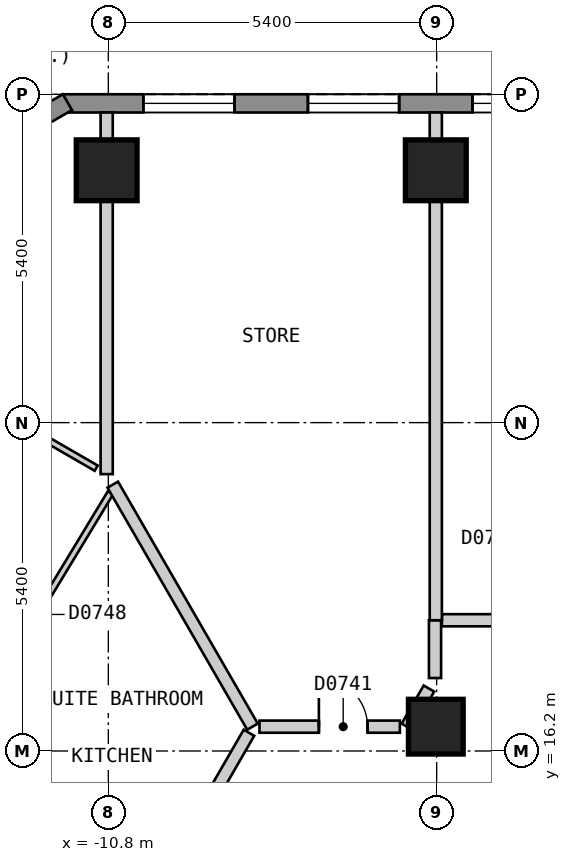
"""IFC4 building model, lengths in metres.
Left out: names, types, materials, properties, quantities, classifications, styles, units other than length and angle.
Written with IfcOpenShell. Run it as: python <this file> out.ifc"""

import sys

from ifc_helpers import new_model, si_unit, direction, frame, frame_2d, origin, origin_2d, place, context, subcontext, project, spatial, polyline, rectangle, outline, extrude, element, fill, save


model = new_model("IFC4")
c1 = context("Model", 3, precision=1e-05, world=origin(), true_north=direction((0.0, 1.0)))
c2 = subcontext(c1, "Body", "Model", "MODEL_VIEW")
j1 = project(units=[si_unit("LENGTHUNIT", "METRE"), si_unit("PLANEANGLEUNIT", "RADIAN")], contexts=[c1])
p1 = place(None, origin())
s1 = spatial("IfcSite", under=j1, at=p1, CompositionType="ELEMENT")
p2 = place(p1, origin())
s2 = spatial("IfcBuilding", under=s1, at=p2, CompositionType="ELEMENT")
p3 = place(p2, frame((0.0, 0.0, 105.0)))
s3 = spatial("IfcBuildingStorey", under=s2, at=p3, CompositionType="ELEMENT", Elevation=105.0)
for number, where, z_axis, x_axis in (
    (1, (-5.414, 25.75, 0.0), (0.0, 0.0, 1.0), (-1.0, 0.0, 0.0)),
    (2, (-10.827, 25.75, 0.0), (0.0, 0.0, 1.0), (-1.0, 0.0, 0.0)),
):
    element("IfcColumn", number, at=place(p3, frame(where, z_axis=z_axis, x_axis=x_axis)), inside=s3, PredefinedType="COLUMN", context=c2, shape_type="SweptSolid", body=[
        extrude(rectangle(XDim=1.0, YDim=1.0, at=origin_2d()), origin(), (0.0, 0.0, 1.0), 3.0),
    ])
p4 = place(p3, frame((-5.414, 16.6, 0.0), z_axis=(0.0, 0.0, 1.0), x_axis=(-1.0, 0.0, 0.0)))
e3 = element("IfcColumn", 3, at=p4, inside=s3, PredefinedType="COLUMN", context=c2, shape_type="SweptSolid", body=[
    extrude(rectangle(XDim=0.9, YDim=0.9, at=origin_2d()), origin(), (0.0, 0.0, 1.0), 3.0),
])
p5 = place(p3, frame((11.547, 26.85, 0.0), z_axis=(0.0, 0.0, 1.0), x_axis=(-1.0, 0.0, 0.0)))
e4 = element("IfcWall", 4, at=p5, inside=s3, PredefinedType="SOLIDWALL", context=c2, shape_type="SweptSolid", body=[
    extrude(outline(polyline([(0.0, -0.15), (23.094, -0.15), (23.014, 0.15), (0.08, 0.15), (0.0, -0.15)])), origin(), (0.0, 0.0, 1.0), 2.6),
])
p6 = place(p5, frame((1.325, 0.0, 0.15)))
e5 = element("IfcOpeningElement", 5, at=p6, cuts=e4, PredefinedType="OPENING", context=c2, shape_type="SweptSolid", body=[
    extrude(rectangle(XDim=1.5, YDim=2.1, at=frame_2d((0.75, 1.05))), frame((0.0, 0.16, 0.0), z_axis=(0.0, -1.0, 0.0), x_axis=(1.0, 0.0, 0.0)), (0.0, 0.0, 1.0), 0.32),
])
p7 = place(p5, frame((4.032, 0.0, 0.15)))
e6 = element("IfcOpeningElement", 6, at=p7, cuts=e4, PredefinedType="OPENING", context=c2, shape_type="SweptSolid", body=[
    extrude(rectangle(XDim=1.5, YDim=2.1, at=frame_2d((0.75, 1.05))), frame((0.0, 0.16, 0.0), z_axis=(0.0, -1.0, 0.0), x_axis=(1.0, 0.0, 0.0)), (0.0, 0.0, 1.0), 0.32),
])
p8 = place(p5, frame((6.738, 0.0, 0.15)))
e7 = element("IfcOpeningElement", 7, at=p8, cuts=e4, PredefinedType="OPENING", context=c2, shape_type="SweptSolid", body=[
    extrude(rectangle(XDim=1.5, YDim=2.1, at=frame_2d((0.75, 1.05))), frame((0.0, 0.16, 0.0), z_axis=(0.0, -1.0, 0.0), x_axis=(1.0, 0.0, 0.0)), (0.0, 0.0, 1.0), 0.32),
])
p9 = place(p5, frame((9.445, 0.0, 0.15)))
e8 = element("IfcOpeningElement", 8, at=p9, cuts=e4, PredefinedType="OPENING", context=c2, shape_type="SweptSolid", body=[
    extrude(rectangle(XDim=1.5, YDim=2.1, at=frame_2d((0.75, 1.05))), frame((0.0, 0.16, 0.0), z_axis=(0.0, -1.0, 0.0), x_axis=(1.0, 0.0, 0.0)), (0.0, 0.0, 1.0), 0.32),
])
p10 = place(p5, frame((12.151, 0.0, 0.15)))
e9 = element("IfcOpeningElement", 9, at=p10, cuts=e4, PredefinedType="OPENING", context=c2, shape_type="SweptSolid", body=[
    extrude(rectangle(XDim=1.5, YDim=2.1, at=frame_2d((0.75, 1.05))), frame((0.0, 0.16, 0.0), z_axis=(0.0, -1.0, 0.0), x_axis=(1.0, 0.0, 0.0)), (0.0, 0.0, 1.0), 0.32),
])
p11 = place(p5, frame((14.858, 0.0, 0.15)))
e10 = element("IfcOpeningElement", 10, at=p11, cuts=e4, PredefinedType="OPENING", context=c2, shape_type="SweptSolid", body=[
    extrude(rectangle(XDim=1.5, YDim=2.1, at=frame_2d((0.75, 1.05))), frame((0.0, 0.16, 0.0), z_axis=(0.0, -1.0, 0.0), x_axis=(1.0, 0.0, 0.0)), (0.0, 0.0, 1.0), 0.32),
])
p12 = place(p5, frame((17.564, 0.0, 0.15)))
e11 = element("IfcOpeningElement", 11, at=p12, cuts=e4, PredefinedType="OPENING", context=c2, shape_type="SweptSolid", body=[
    extrude(rectangle(XDim=1.5, YDim=2.1, at=frame_2d((0.75, 1.05))), frame((0.0, 0.16, 0.0), z_axis=(0.0, -1.0, 0.0), x_axis=(1.0, 0.0, 0.0)), (0.0, 0.0, 1.0), 0.32),
])
p13 = place(p5, frame((20.271, 0.0, 0.15)))
e12 = element("IfcOpeningElement", 12, at=p13, cuts=e4, PredefinedType="OPENING", context=c2, shape_type="SweptSolid", body=[
    extrude(rectangle(XDim=1.5, YDim=2.1, at=frame_2d((0.75, 1.05))), frame((0.0, 0.16, 0.0), z_axis=(0.0, -1.0, 0.0), x_axis=(1.0, 0.0, 0.0)), (0.0, 0.0, 1.0), 0.32),
])
p14 = place(p3, frame((-11.472, 26.87, 0.0), z_axis=(0.0, 0.0, 1.0), x_axis=(-0.866022959057, -0.500004234368, 0.0)))
e13 = element("IfcWall", 13, at=p14, inside=s3, PredefinedType="SOLIDWALL", context=c2, shape_type="SweptSolid", body=[
    extrude(outline(polyline([(0.0, -0.15), (5.0, -0.15), (4.92, 0.15), (0.08, 0.15), (0.0, -0.15)])), origin(), (0.0, 0.0, 1.0), 2.6),
])
p15 = place(p14, frame((0.65, 0.0, 0.15)))
e14 = element("IfcOpeningElement", 14, at=p15, cuts=e13, PredefinedType="OPENING", context=c2, shape_type="SweptSolid", body=[
    extrude(rectangle(XDim=1.2, YDim=2.1, at=frame_2d((0.6, 1.05))), frame((0.0, 0.16, 0.0), z_axis=(0.0, -1.0, 0.0), x_axis=(1.0, 0.0, 0.0)), (0.0, 0.0, 1.0), 0.32),
])
p16 = place(p14, frame((3.149, 0.0, 0.15)))
e15 = element("IfcOpeningElement", 15, at=p16, cuts=e13, PredefinedType="OPENING", context=c2, shape_type="SweptSolid", body=[
    extrude(rectangle(XDim=1.2, YDim=2.1, at=frame_2d((0.6, 1.05))), frame((0.0, 0.16, 0.0), z_axis=(0.0, -1.0, 0.0), x_axis=(1.0, 0.0, 0.0)), (0.0, 0.0, 1.0), 0.32),
])
p17 = place(p3, frame((-8.314, 16.6, 0.0), z_axis=(0.0, 0.0, 1.0), x_axis=(1.0, 0.0, 0.0)))
e16 = element("IfcWall", 16, at=p17, inside=s3, PredefinedType="PARTITIONING", context=c2, shape_type="SweptSolid", body=[
    extrude(rectangle(XDim=2.309, YDim=0.2, at=frame_2d((1.155, 0.0))), origin(), (0.0, 0.0, 1.0), 2.6),
])
p18 = place(p17, frame((0.977, 0.0, 0.0)))
e17 = element("IfcOpeningElement", 17, at=p18, cuts=e16, PredefinedType="OPENING", context=c2, shape_type="SweptSolid", body=[
    extrude(rectangle(XDim=0.8, YDim=2.1, at=frame_2d((0.4, 1.05))), frame((0.0, 0.11, 0.0), z_axis=(0.0, -1.0, 0.0), x_axis=(1.0, 0.0, 0.0)), (0.0, 0.0, 1.0), 0.22),
])
p19 = place(p3, frame((-5.314, 18.35, 0.0), z_axis=(0.0, 0.0, 1.0), x_axis=(1.0, 0.0, 0.0)))
e18 = element("IfcWall", 18, at=p19, inside=s3, PredefinedType="PARTITIONING", context=c2, shape_type="SweptSolid", body=[
    extrude(rectangle(XDim=7.062, YDim=0.2, at=frame_2d((3.531, 0.0))), origin(), (0.0, 0.0, 1.0), 2.6),
])
p20 = place(p19, frame((2.106, 0.0, 0.0)))
e19 = element("IfcOpeningElement", 19, at=p20, cuts=e18, PredefinedType="OPENING", context=c2, shape_type="SweptSolid", body=[
    extrude(rectangle(XDim=1.0, YDim=2.1, at=frame_2d((0.5, 1.05))), frame((0.0, 0.11, 0.0), z_axis=(0.0, -1.0, 0.0), x_axis=(1.0, 0.0, 0.0)), (0.0, 0.0, 1.0), 0.22),
])
p21 = place(p3, frame((-5.889, 16.6, 0.0), z_axis=(0.0, 0.0, 1.0), x_axis=(0.499839240638, 0.866118198353, 0.0)))
e20 = element("IfcWall", 20, at=p21, inside=s3, PredefinedType="PARTITIONING", context=c2, shape_type="SweptSolid", body=[
    extrude(rectangle(XDim=0.724, YDim=0.2, at=frame_2d((0.362, 0.0))), origin(), (0.0, 0.0, 1.0), 2.6),
])
p22 = place(p3, frame((-18.533, -0.901, 0.0), z_axis=(0.0, 0.0, 1.0), x_axis=(0.499981198768, 0.866036258409, 0.0)))
e21 = element("IfcWall", 21, at=p22, inside=s3, PredefinedType="PARTITIONING", context=c2, shape_type="SweptSolid", body=[
    extrude(rectangle(XDim=20.093, YDim=0.2, at=frame_2d((10.046, 0.0))), origin(), (0.0, 0.0, 1.0), 2.6),
])
p23 = place(p22, frame((14.57, 0.0, 0.0)))
e22 = element("IfcOpeningElement", 22, at=p23, cuts=e21, PredefinedType="OPENING", context=c2, shape_type="SweptSolid", body=[
    extrude(rectangle(XDim=1.0, YDim=2.1, at=frame_2d((0.5, 1.05))), frame((0.0, 0.11, 0.0), z_axis=(0.0, -1.0, 0.0), x_axis=(1.0, 0.0, 0.0)), (0.0, 0.0, 1.0), 0.22),
])
p24 = place(p22, frame((4.523, 0.0, 0.0)))
e23 = element("IfcOpeningElement", 23, at=p24, cuts=e21, PredefinedType="OPENING", context=c2, shape_type="SweptSolid", body=[
    extrude(rectangle(XDim=1.0, YDim=2.1, at=frame_2d((0.5, 1.05))), frame((0.0, 0.11, 0.0), z_axis=(0.0, -1.0, 0.0), x_axis=(1.0, 0.0, 0.0)), (0.0, 0.0, 1.0), 0.22),
])
p25 = place(p3, frame((-5.427, 17.4, 0.0), z_axis=(0.0, 0.0, 1.0), x_axis=(0.0, 1.0, 0.0)))
e24 = element("IfcWall", 24, at=p25, inside=s3, PredefinedType="PARTITIONING", context=c2, shape_type="SweptSolid", body=[
    extrude(rectangle(XDim=0.95, YDim=0.2, at=frame_2d((0.475, 0.0))), origin(), (0.0, 0.0, 1.0), 2.6),
])
p26 = place(p3, frame((-18.489, 19.375, 0.0), z_axis=(0.0, 0.0, 1.0), x_axis=(0.866016855193, -0.500014806302, 0.0)))
e25 = element("IfcWall", 25, at=p26, inside=s3, PredefinedType="PARTITIONING", context=c2, shape_type="SweptSolid", body=[
    extrude(rectangle(XDim=10.0, YDim=0.1, at=frame_2d((5.0, 0.0))), origin(), (0.0, 0.0, 1.0), 2.6),
])
p27 = place(p26, frame((2.577, 0.0, 0.0)))
e26 = element("IfcOpeningElement", 26, at=p27, cuts=e25, PredefinedType="OPENING", context=c2, shape_type="SweptSolid", body=[
    extrude(rectangle(XDim=0.9, YDim=2.1, at=frame_2d((0.45, 1.05))), frame((0.0, 0.06, 0.0), z_axis=(0.0, -1.0, 0.0), x_axis=(1.0, 0.0, 0.0)), (0.0, 0.0, 1.0), 0.12),
])
p28 = place(p3, frame((-15.977, 23.725, 0.0), z_axis=(0.0, 0.0, 1.0), x_axis=(0.866028566888, -0.499994521305, 0.0)))
e27 = element("IfcWall", 27, at=p28, inside=s3, PredefinedType="PARTITIONING", context=c2, shape_type="SweptSolid", body=[
    extrude(rectangle(XDim=5.748, YDim=0.1, at=frame_2d((2.874, 0.0))), origin(), (0.0, 0.0, 1.0), 2.6),
])
p29 = place(p28, frame((2.524, 0.0, 0.0)))
e28 = element("IfcOpeningElement", 28, at=p29, cuts=e27, PredefinedType="OPENING", context=c2, shape_type="SweptSolid", body=[
    extrude(rectangle(XDim=0.9, YDim=2.1, at=frame_2d((0.45, 1.05))), frame((0.0, 0.06, 0.0), z_axis=(0.0, -1.0, 0.0), x_axis=(1.0, 0.0, 0.0)), (0.0, 0.0, 1.0), 0.12),
])
p30 = place(p3, frame((-13.221, 16.391, 0.0), z_axis=(0.0, 0.0, 1.0), x_axis=(0.518164725284, 0.855280841286, 0.0)))
e29 = element("IfcWall", 29, at=p30, inside=s3, PredefinedType="PARTITIONING", context=c2, shape_type="SweptSolid", body=[
    extrude(rectangle(XDim=4.74, YDim=0.1, at=frame_2d((2.37, 0.0))), origin(), (0.0, 0.0, 1.0), 2.6),
])
p31 = place(p30, frame((2.002, 0.0, 0.0)))
e30 = element("IfcOpeningElement", 30, at=p31, cuts=e29, PredefinedType="OPENING", context=c2, shape_type="SweptSolid", body=[
    extrude(rectangle(XDim=0.8, YDim=2.1, at=frame_2d((0.4, 1.05))), frame((0.0, 0.06, 0.0), z_axis=(0.0, -1.0, 0.0), x_axis=(1.0, 0.0, 0.0)), (0.0, 0.0, 1.0), 0.12),
])
p32 = place(p3, frame((-10.727, 20.58, 0.0), z_axis=(0.0, 0.0, 1.0), x_axis=(0.500041272028, -0.866001574057, 0.0)))
e31 = element("IfcWall", 31, at=p32, inside=s3, PredefinedType="PARTITIONING", context=c2, shape_type="SweptSolid", body=[
    extrude(rectangle(XDim=4.596, YDim=0.2, at=frame_2d((2.298, 0.0))), origin(), (0.0, 0.0, 1.0), 2.6),
])
p33 = place(p3, frame((-5.414, 26.7, 0.0), z_axis=(0.0, 0.0, 1.0), x_axis=(0.0, -1.0, 0.0)))
e32 = element("IfcWall", 32, at=p33, inside=s3, PredefinedType="PARTITIONING", context=c2, shape_type="SweptSolid", body=[
    extrude(rectangle(XDim=8.35, YDim=0.2, at=frame_2d((4.175, 0.0))), origin(), (0.0, 0.0, 1.0), 2.6),
])
p34 = place(p3, frame((-10.827, 20.753, 0.0), z_axis=(0.0, 0.0, 1.0), x_axis=(0.0, 1.0, 0.0)))
e33 = element("IfcWall", 33, at=p34, inside=s3, PredefinedType="PARTITIONING", context=c2, shape_type="SweptSolid", body=[
    extrude(rectangle(XDim=5.947, YDim=0.2, at=frame_2d((2.974, 0.0))), origin(), (0.0, 0.0, 1.0), 2.6),
])
p35 = place(p11, origin())
e34 = element("IfcWindow", 34, at=p35, inside=s3, PartitioningType="SINGLE_PANEL", PredefinedType="WINDOW", context=c2, shape_type="SweptSolid", body=[
    extrude(rectangle(XDim=1.5, YDim=2.1, at=frame_2d((0.75, 1.05))), frame((0.0, 0.03, 0.0), z_axis=(0.0, -1.0, 0.0), x_axis=(1.0, 0.0, 0.0)), (0.0, 0.0, 1.0), 0.06),
])
fill(e10, e34)
p36 = place(p12, origin())
e35 = element("IfcWindow", 35, at=p36, inside=s3, PartitioningType="SINGLE_PANEL", PredefinedType="WINDOW", context=c2, shape_type="SweptSolid", body=[
    extrude(rectangle(XDim=1.5, YDim=2.1, at=frame_2d((0.75, 1.05))), frame((0.0, 0.03, 0.0), z_axis=(0.0, -1.0, 0.0), x_axis=(1.0, 0.0, 0.0)), (0.0, 0.0, 1.0), 0.06),
])
fill(e11, e35)
p37 = place(p13, origin())
e36 = element("IfcWindow", 36, at=p37, inside=s3, PartitioningType="SINGLE_PANEL", PredefinedType="WINDOW", context=c2, shape_type="SweptSolid", body=[
    extrude(rectangle(XDim=1.5, YDim=2.1, at=frame_2d((0.75, 1.05))), frame((0.0, 0.03, 0.0), z_axis=(0.0, -1.0, 0.0), x_axis=(1.0, 0.0, 0.0)), (0.0, 0.0, 1.0), 0.06),
])
fill(e12, e36)
p38 = place(p18, origin())
e37 = element("IfcDoor", 37, at=p38, inside=s3, OperationType="SINGLE_SWING_LEFT", PredefinedType="DOOR", context=c2, shape_type="SweptSolid", body=[
    extrude(rectangle(XDim=0.8, YDim=2.1, at=frame_2d((0.4, 1.05))), frame((0.0, 0.025, 0.0), z_axis=(0.0, -1.0, 0.0), x_axis=(1.0, 0.0, 0.0)), (0.0, 0.0, 1.0), 0.05),
])
fill(e17, e37)
save(model, sys.argv[1])
